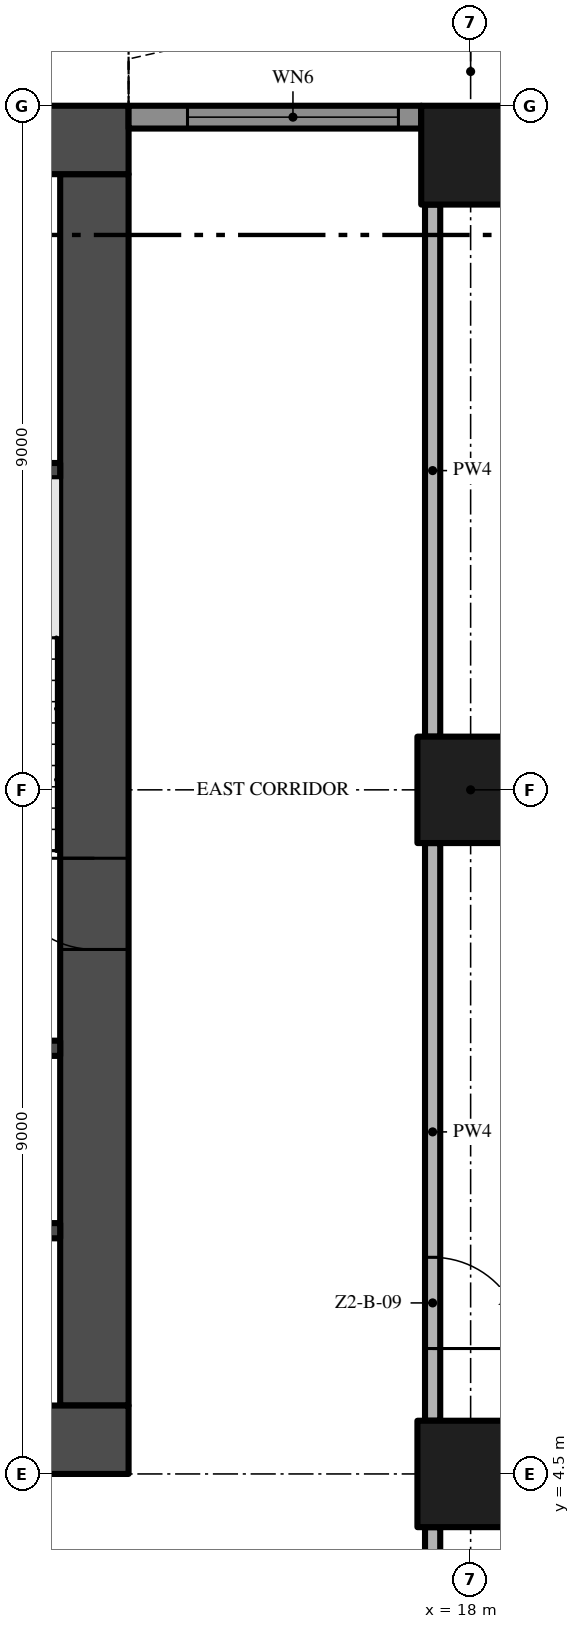
"""IFC4 building model, lengths in metres.
Left out: names, types, materials, properties, quantities, classifications, styles, units other than length and angle.
Written with IfcOpenShell. Run it as: python <this file> out.ifc"""

import sys

from ifc_helpers import new_model, si_unit, direction, frame, frame_2d, origin, origin_2d, place, context, subcontext, project, spatial, polyline, rectangle, outline, extrude, element, fill, save


model = new_model("IFC4")
c1 = context("Model", 3, precision=1e-05, world=origin(), true_north=direction((0.0, 1.0)))
c2 = subcontext(c1, "Body", "Model", "MODEL_VIEW")
j1 = project(units=[si_unit("LENGTHUNIT", "METRE"), si_unit("PLANEANGLEUNIT", "RADIAN")], contexts=[c1])
p1 = place(None, origin())
s1 = spatial("IfcSite", under=j1, at=p1, CompositionType="ELEMENT")
p2 = place(p1, origin())
s2 = spatial("IfcBuilding", under=s1, at=p2, CompositionType="ELEMENT")
p3 = place(p2, frame((0.0, 0.0, 80.8)))
s3 = spatial("IfcBuildingStorey", under=s2, at=p3, CompositionType="ELEMENT", Elevation=80.8)
p4 = place(p3, frame((-13.5, 4.95, -0.3), z_axis=(0.0, 0.0, 1.0), x_axis=(1.0, 0.0, 0.0)))
e1 = element("IfcWall", 1, at=p4, inside=s3, PredefinedType="SHEAR", context=c2, shape_type="SweptSolid", body=[
    extrude(rectangle(XDim=27.0, YDim=0.9, at=frame_2d((13.5, 0.0))), origin(), (0.0, 0.0, 1.0), 3.8),
])
p5 = place(p4, frame((12.0, 0.0, 0.3)))
e2 = element("IfcOpeningElement", 2, at=p5, cuts=e1, PredefinedType="OPENING", context=c2, shape_type="SweptSolid", body=[
    extrude(rectangle(XDim=3.0, YDim=2.4, at=frame_2d((1.5, 1.2))), frame((0.0, 0.46, 0.0), z_axis=(0.0, -1.0, 0.0), x_axis=(1.0, 0.0, 0.0)), (0.0, 0.0, 1.0), 0.92),
])
p6 = place(p4, frame((4.9, 0.0, 0.3)))
e3 = element("IfcOpeningElement", 3, at=p6, cuts=e1, PredefinedType="OPENING", context=c2, shape_type="SweptSolid", body=[
    extrude(rectangle(XDim=1.2, YDim=2.2, at=frame_2d((0.6, 1.1))), frame((0.0, 0.46, 0.0), z_axis=(0.0, -1.0, 0.0), x_axis=(1.0, 0.0, 0.0)), (0.0, 0.0, 1.0), 0.92),
])
p7 = place(p4, frame((20.75, 0.0, 0.3)))
e4 = element("IfcOpeningElement", 4, at=p7, cuts=e1, PredefinedType="OPENING", context=c2, shape_type="SweptSolid", body=[
    extrude(rectangle(XDim=1.5, YDim=2.2, at=frame_2d((0.75, 1.1))), frame((0.0, 0.46, 0.0), z_axis=(0.0, -1.0, 0.0), x_axis=(1.0, 0.0, 0.0)), (0.0, 0.0, 1.0), 0.92),
])
p8 = place(p4, frame((17.4, 0.0, 0.3)))
e5 = element("IfcOpeningElement", 5, at=p8, cuts=e1, PredefinedType="OPENING", context=c2, shape_type="SweptSolid", body=[
    extrude(rectangle(XDim=1.2, YDim=2.2, at=frame_2d((0.6, 1.1))), frame((0.0, 0.46, 0.0), z_axis=(0.0, -1.0, 0.0), x_axis=(1.0, 0.0, 0.0)), (0.0, 0.0, 1.0), 0.92),
])
p9 = place(p3, frame((13.05, 5.4, -0.3), z_axis=(0.0, 0.0, 1.0), x_axis=(0.0, 1.0, 0.0)))
e6 = element("IfcWall", 6, at=p9, inside=s3, PredefinedType="SHEAR", context=c2, shape_type="SweptSolid", body=[
    extrude(rectangle(XDim=16.2, YDim=0.9, at=frame_2d((8.1, 0.0))), origin(), (0.0, 0.0, 1.0), 3.8),
])
p10 = place(p9, frame((6.0, 0.0, 0.3)))
e7 = element("IfcOpeningElement", 7, at=p10, cuts=e6, PredefinedType="OPENING", context=c2, shape_type="SweptSolid", body=[
    extrude(rectangle(XDim=1.2, YDim=2.2, at=frame_2d((0.6, 1.1))), frame((0.0, 0.46, 0.0), z_axis=(0.0, -1.0, 0.0), x_axis=(1.0, 0.0, 0.0)), (0.0, 0.0, 1.0), 0.92),
])
p11 = place(p3, frame((13.5, 22.05, -0.3), z_axis=(0.0, 0.0, 1.0), x_axis=(-1.0, 0.0, 0.0)))
e8 = element("IfcWall", 8, at=p11, inside=s3, PredefinedType="SHEAR", context=c2, shape_type="SweptSolid", body=[
    extrude(rectangle(XDim=27.0, YDim=0.9, at=frame_2d((13.5, 0.0))), origin(), (0.0, 0.0, 1.0), 3.8),
])
p12 = place(p3, frame((18.0, 13.5, 0.0), z_axis=(0.0, 0.0, 1.0), x_axis=(1.0, 0.0, 0.0)))
e9 = element("IfcColumn", 9, at=p12, inside=s3, PredefinedType="COLUMN", context=c2, shape_type="SweptSolid", body=[
    extrude(rectangle(XDim=1.4, YDim=1.4, at=origin_2d()), origin(), (0.0, 0.0, 1.0), 3.5),
])
p13 = place(p3, frame((18.0, 21.85, 0.0), z_axis=(0.0, 0.0, 1.0), x_axis=(1.0, 0.0, 0.0)))
e10 = element("IfcColumn", 10, at=p13, inside=s3, PredefinedType="COLUMN", context=c2, shape_type="SweptSolid", body=[
    extrude(rectangle(XDim=1.3, YDim=1.3, at=origin_2d()), origin(), (0.0, 0.0, 1.0), 3.5),
])
p14 = place(p3, frame((18.0, 4.5, 0.0), z_axis=(0.0, 0.0, 1.0), x_axis=(1.0, 0.0, 0.0)))
e11 = element("IfcColumn", 11, at=p14, inside=s3, PredefinedType="COLUMN", context=c2, shape_type="SweptSolid", body=[
    extrude(rectangle(XDim=1.4, YDim=1.4, at=origin_2d()), origin(), (0.0, 0.0, 1.0), 3.5),
])
p15 = place(p3, frame((13.5, 22.35, 0.0), z_axis=(0.0, 0.0, 1.0), x_axis=(1.0, 0.0, 0.0)))
e12 = element("IfcWall", 12, at=p15, inside=s3, PredefinedType="SOLIDWALL", context=c2, shape_type="SweptSolid", body=[
    extrude(rectangle(XDim=3.85, YDim=0.3, at=frame_2d((1.925, 0.0))), origin(), (0.0, 0.0, 1.0), 3.5),
])
p16 = place(p15, frame((0.775, 0.0, 0.45)))
e13 = element("IfcOpeningElement", 13, at=p16, cuts=e12, PredefinedType="OPENING", context=c2, shape_type="SweptSolid", body=[
    extrude(rectangle(XDim=2.775, YDim=2.65, at=frame_2d((1.387, 1.325))), frame((0.0, 0.16, 0.0), z_axis=(0.0, -1.0, 0.0), x_axis=(1.0, 0.0, 0.0)), (0.0, 0.0, 1.0), 0.32),
])
p17 = place(p3, origin())
e14 = element("IfcWall", 14, at=p17, inside=s3, PredefinedType="USERDEFINED", context=c2, shape_type="SweptSolid", body=[
    extrude(outline(polyline([(22.5, 25.149), (21.0, 25.485), (20.625, 25.5), (19.5, 25.369), (18.0, 24.845), (16.5, 24.112), (15.0, 23.451), (13.5, 23.115), (13.555, 22.871), (15.079, 23.213), (16.605, 23.885), (18.096, 24.614), (19.556, 25.124), (20.635, 25.249), (20.967, 25.236), (22.445, 24.905), (22.5, 25.149)])), origin(), (0.0, 0.0, 1.0), 0.9),
])
for number, where, z_axis, x_axis in (
    (15, (9.65, 7.7, 0.0), (0.0, 0.0, 1.0), (1.0, 0.0, 0.0)),
    (16, (9.65, 10.1, 0.0), (0.0, 0.0, 1.0), (1.0, 0.0, 0.0)),
    (17, (9.65, 17.7, 0.0), (0.0, 0.0, 1.0), (1.0, 0.0, 0.0)),
):
    element("IfcWall", number, at=place(p3, frame(where, z_axis=z_axis, x_axis=x_axis)), inside=s3, PredefinedType="SHEAR", context=c2, shape_type="SweptSolid", body=[
        extrude(rectangle(XDim=2.95, YDim=0.2, at=frame_2d((1.475, 0.0))), origin(), (0.0, 0.0, 1.0), 3.5),
    ])
p18 = place(p3, frame((17.5, -0.2, 0.0), z_axis=(0.0, 0.0, 1.0), x_axis=(0.0, 1.0, 0.0)))
e18 = element("IfcWall", 18, at=p18, inside=s3, PredefinedType="PARTITIONING", context=c2, shape_type="SweptSolid", body=[
    extrude(rectangle(XDim=4.0, YDim=0.2, at=frame_2d((2.0, 0.0))), origin(), (0.0, 0.0, 1.0), 3.5),
])
p19 = place(p3, frame((17.5, 12.8, 0.0), z_axis=(0.0, 0.0, 1.0), x_axis=(0.0, -1.0, 0.0)))
e19 = element("IfcWall", 19, at=p19, inside=s3, PredefinedType="PARTITIONING", context=c2, shape_type="SweptSolid", body=[
    extrude(rectangle(XDim=7.6, YDim=0.2, at=frame_2d((3.8, 0.0))), origin(), (0.0, 0.0, 1.0), 3.5),
])
p20 = place(p19, frame((5.45, 0.0, 0.0)))
e20 = element("IfcOpeningElement", 20, at=p20, cuts=e19, PredefinedType="OPENING", context=c2, shape_type="SweptSolid", body=[
    extrude(rectangle(XDim=1.2, YDim=2.4, at=frame_2d((0.6, 1.2))), frame((0.0, 0.11, 0.0), z_axis=(0.0, -1.0, 0.0), x_axis=(1.0, 0.0, 0.0)), (0.0, 0.0, 1.0), 0.22),
])
p21 = place(p3, frame((17.5, 14.2, 0.0), z_axis=(0.0, 0.0, 1.0), x_axis=(0.0, 1.0, 0.0)))
e21 = element("IfcWall", 21, at=p21, inside=s3, PredefinedType="PARTITIONING", context=c2, shape_type="SweptSolid", body=[
    extrude(rectangle(XDim=7.0, YDim=0.2, at=frame_2d((3.5, 0.0))), origin(), (0.0, 0.0, 1.0), 3.5),
])
p22 = place(p16, origin())
e22 = element("IfcWindow", 22, at=p22, inside=s3, PartitioningType="SINGLE_PANEL", PredefinedType="WINDOW", context=c2, shape_type="SweptSolid", body=[
    extrude(rectangle(XDim=2.775, YDim=2.65, at=frame_2d((1.387, 1.325))), frame((0.0, 0.03, 0.0), z_axis=(0.0, -1.0, 0.0), x_axis=(1.0, 0.0, 0.0)), (0.0, 0.0, 1.0), 0.06),
])
fill(e13, e22)
p23 = place(p10, frame((1.2, 0.0, 0.0), z_axis=(0.0, 0.0, 1.0), x_axis=(-1.0, 0.0, 0.0)))
e23 = element("IfcDoor", 23, at=p23, inside=s3, OperationType="SINGLE_SWING_LEFT", PredefinedType="DOOR", context=c2, shape_type="SweptSolid", body=[
    extrude(rectangle(XDim=1.2, YDim=2.2, at=frame_2d((0.6, 1.1))), frame((0.0, 0.025, 0.0), z_axis=(0.0, -1.0, 0.0), x_axis=(1.0, 0.0, 0.0)), (0.0, 0.0, 1.0), 0.05),
])
fill(e7, e23)
p24 = place(p20, origin())
e24 = element("IfcDoor", 24, at=p24, inside=s3, OperationType="SINGLE_SWING_RIGHT", PredefinedType="DOOR", context=c2, shape_type="SweptSolid", body=[
    extrude(rectangle(XDim=1.2, YDim=2.4, at=frame_2d((0.6, 1.2))), frame((0.0, 0.025, 0.0), z_axis=(0.0, -1.0, 0.0), x_axis=(1.0, 0.0, 0.0)), (0.0, 0.0, 1.0), 0.05),
])
fill(e20, e24)
save(model, sys.argv[1])
